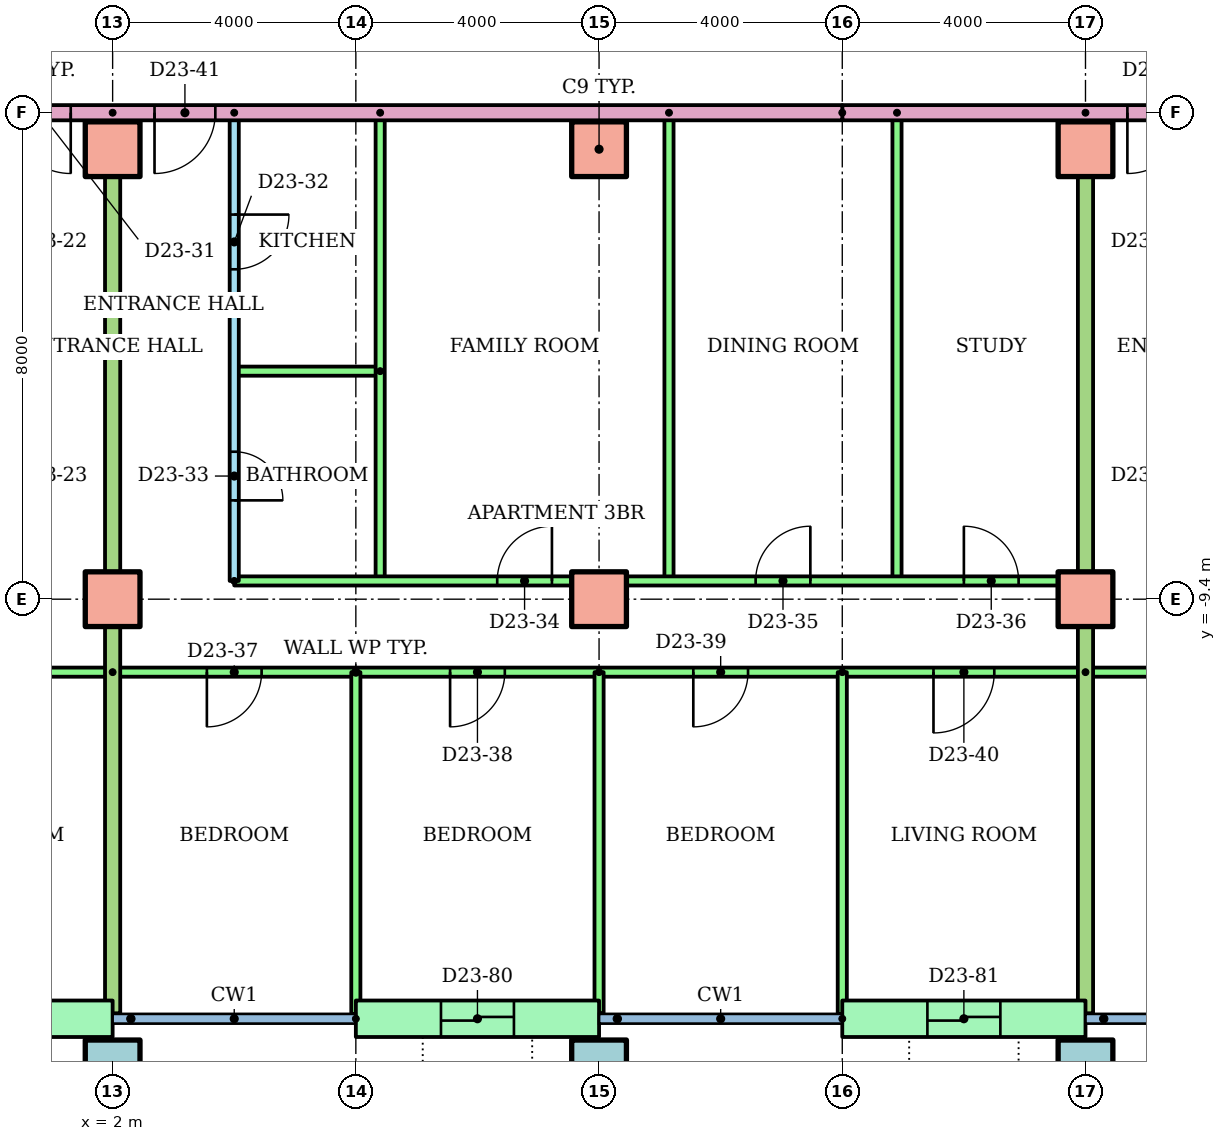
"""IFC4 building model, lengths in metres.
Left out: names, types, materials, properties, quantities, classifications, styles, units other than length and angle.
Written with IfcOpenShell. Run it as: python <this file> out.ifc"""

import sys

from ifc_helpers import new_model, si_unit, direction, frame, frame_2d, origin, origin_2d, place, context, subcontext, project, spatial, rectangle, hollow_rectangle, extrude, element, fill, save


model = new_model("IFC4")
c1 = context("Model", 3, precision=1e-05, world=origin(), true_north=direction((0.0, 1.0)))
c2 = subcontext(c1, "Body", "Model", "MODEL_VIEW")
j1 = project(units=[si_unit("LENGTHUNIT", "METRE"), si_unit("PLANEANGLEUNIT", "RADIAN")], contexts=[c1])
p1 = place(None, origin())
s1 = spatial("IfcSite", under=j1, at=p1, CompositionType="ELEMENT")
p2 = place(p1, origin())
s2 = spatial("IfcBuilding", under=s1, at=p2, CompositionType="ELEMENT")
p3 = place(p2, frame((0.0, 0.0, 90.3)))
s3 = spatial("IfcBuildingStorey", under=s2, at=p3, CompositionType="ELEMENT", Elevation=90.3)
for number, where in (
    (1, (2.0, -17.1, 0.0)),
    (2, (10.0, -17.1, 0.0)),
    (3, (18.0, -17.1, 0.0)),
):
    element("IfcColumn", number, at=place(p3, frame(where)), inside=s3, PredefinedType="COLUMN", context=c2, shape_type="SweptSolid", body=[
        extrude(hollow_rectangle(XDim=0.9, YDim=0.9, WallThickness=0.045, at=origin_2d()), origin(), (0.0, 0.0, 1.0), 3.2),
    ])
for number, where in (
    (4, (2.0, -9.4, 0.0)),
    (5, (10.0, -9.4, 0.0)),
    (6, (18.0, -9.4, 0.0)),
    (7, (2.0, -2.0, 0.0)),
    (8, (10.0, -2.0, 0.0)),
    (9, (18.0, -2.0, 0.0)),
):
    element("IfcColumn", number, at=place(p3, frame(where)), inside=s3, PredefinedType="COLUMN", context=c2, shape_type="SweptSolid", body=[
        extrude(rectangle(XDim=0.9, YDim=0.9, at=origin_2d()), origin(), (0.0, 0.0, 1.0), 3.2),
    ])
p4 = place(p3, frame((-2.0, -16.3, 0.0)))
e10 = element("IfcWall", 10, at=p4, inside=s3, PredefinedType="STANDARD", context=c2, shape_type="SweptSolid", body=[
    extrude(rectangle(XDim=4.0, YDim=0.6, at=frame_2d((2.0, 0.0))), origin(), (0.0, 0.0, 1.0), 2.92),
])
p5 = place(p4, frame((1.4, 0.0, 0.0)))
e11 = element("IfcOpeningElement", 11, at=p5, cuts=e10, PredefinedType="OPENING", context=c2, shape_type="SweptSolid", body=[
    extrude(rectangle(XDim=1.2, YDim=2.1, at=frame_2d((0.6, 1.05))), frame((0.0, 0.31, 0.0), z_axis=(0.0, -1.0, 0.0), x_axis=(1.0, 0.0, 0.0)), (0.0, 0.0, 1.0), 0.62),
])
p6 = place(p3, frame((6.0, -16.3, 0.0)))
e12 = element("IfcWall", 12, at=p6, inside=s3, PredefinedType="STANDARD", context=c2, shape_type="SweptSolid", body=[
    extrude(rectangle(XDim=4.0, YDim=0.6, at=frame_2d((2.0, 0.0))), origin(), (0.0, 0.0, 1.0), 2.92),
])
p7 = place(p6, frame((1.4, 0.0, 0.0)))
e13 = element("IfcOpeningElement", 13, at=p7, cuts=e12, PredefinedType="OPENING", context=c2, shape_type="SweptSolid", body=[
    extrude(rectangle(XDim=1.2, YDim=2.1, at=frame_2d((0.6, 1.05))), frame((0.0, 0.31, 0.0), z_axis=(0.0, -1.0, 0.0), x_axis=(1.0, 0.0, 0.0)), (0.0, 0.0, 1.0), 0.62),
])
p8 = place(p3, frame((14.0, -16.3, 0.0)))
e14 = element("IfcWall", 14, at=p8, inside=s3, PredefinedType="STANDARD", context=c2, shape_type="SweptSolid", body=[
    extrude(rectangle(XDim=4.0, YDim=0.6, at=frame_2d((2.0, 0.0))), origin(), (0.0, 0.0, 1.0), 2.92),
])
p9 = place(p8, frame((1.4, 0.0, 0.0)))
e15 = element("IfcOpeningElement", 15, at=p9, cuts=e14, PredefinedType="OPENING", context=c2, shape_type="SweptSolid", body=[
    extrude(rectangle(XDim=1.2, YDim=2.1, at=frame_2d((0.6, 1.05))), frame((0.0, 0.31, 0.0), z_axis=(0.0, -1.0, 0.0), x_axis=(1.0, 0.0, 0.0)), (0.0, 0.0, 1.0), 0.62),
])
p10 = place(p3, frame((2.0, -10.6, 0.0), z_axis=(0.0, 0.0, 1.0), x_axis=(-1.0, 0.0, 0.0)))
e16 = element("IfcWall", 16, at=p10, inside=s3, PredefinedType="PARTITIONING", context=c2, shape_type="SweptSolid", body=[
    extrude(rectangle(XDim=16.0, YDim=0.15, at=frame_2d((8.0, 0.0))), origin(), (0.0, 0.0, 1.0), 2.4),
])
p11 = place(p10, frame((13.55, 0.0, 0.0)))
e17 = element("IfcOpeningElement", 17, at=p11, cuts=e16, PredefinedType="OPENING", context=c2, shape_type="SweptSolid", body=[
    extrude(rectangle(XDim=0.9, YDim=2.1, at=frame_2d((0.45, 1.05))), frame((0.0, 0.085, 0.0), z_axis=(0.0, -1.0, 0.0), x_axis=(1.0, 0.0, 0.0)), (0.0, 0.0, 1.0), 0.17),
])
p12 = place(p10, frame((9.55, 0.0, 0.0)))
e18 = element("IfcOpeningElement", 18, at=p12, cuts=e16, PredefinedType="OPENING", context=c2, shape_type="SweptSolid", body=[
    extrude(rectangle(XDim=0.9, YDim=2.1, at=frame_2d((0.45, 1.05))), frame((0.0, 0.085, 0.0), z_axis=(0.0, -1.0, 0.0), x_axis=(1.0, 0.0, 0.0)), (0.0, 0.0, 1.0), 0.17),
])
p13 = place(p10, frame((5.55, 0.0, 0.0)))
e19 = element("IfcOpeningElement", 19, at=p13, cuts=e16, PredefinedType="OPENING", context=c2, shape_type="SweptSolid", body=[
    extrude(rectangle(XDim=0.9, YDim=2.1, at=frame_2d((0.45, 1.05))), frame((0.0, 0.085, 0.0), z_axis=(0.0, -1.0, 0.0), x_axis=(1.0, 0.0, 0.0)), (0.0, 0.0, 1.0), 0.17),
])
p14 = place(p10, frame((1.5, 0.0, 0.0)))
e20 = element("IfcOpeningElement", 20, at=p14, cuts=e16, PredefinedType="OPENING", context=c2, shape_type="SweptSolid", body=[
    extrude(rectangle(XDim=1.0, YDim=2.1, at=frame_2d((0.5, 1.05))), frame((0.0, 0.085, 0.0), z_axis=(0.0, -1.0, 0.0), x_axis=(1.0, 0.0, 0.0)), (0.0, 0.0, 1.0), 0.17),
])
p15 = place(p3, frame((4.0, -1.4, 0.0), z_axis=(0.0, 0.0, 1.0), x_axis=(0.0, -1.0, 0.0)))
e21 = element("IfcWall", 21, at=p15, inside=s3, PredefinedType="PARTITIONING", context=c2, shape_type="SweptSolid", body=[
    extrude(rectangle(XDim=7.7, YDim=0.15, at=frame_2d((3.85, 0.0))), origin(), (0.0, 0.0, 1.0), 2.4),
])
p16 = place(p15, frame((1.675, 0.0, 0.0)))
e22 = element("IfcOpeningElement", 22, at=p16, cuts=e21, PredefinedType="OPENING", context=c2, shape_type="SweptSolid", body=[
    extrude(rectangle(XDim=0.9, YDim=2.1, at=frame_2d((0.45, 1.05))), frame((0.0, 0.085, 0.0), z_axis=(0.0, -1.0, 0.0), x_axis=(1.0, 0.0, 0.0)), (0.0, 0.0, 1.0), 0.17),
])
p17 = place(p15, frame((5.575, 0.0, 0.0)))
e23 = element("IfcOpeningElement", 23, at=p17, cuts=e21, PredefinedType="OPENING", context=c2, shape_type="SweptSolid", body=[
    extrude(rectangle(XDim=0.8, YDim=2.1, at=frame_2d((0.4, 1.05))), frame((0.0, 0.085, 0.0), z_axis=(0.0, -1.0, 0.0), x_axis=(1.0, 0.0, 0.0)), (0.0, 0.0, 1.0), 0.17),
])
p18 = place(p3, frame((6.4, -5.65, 0.0), z_axis=(0.0, 0.0, 1.0), x_axis=(-1.0, 0.0, 0.0)))
e24 = element("IfcWall", 24, at=p18, inside=s3, PredefinedType="PARTITIONING", context=c2, shape_type="SweptSolid", body=[
    extrude(rectangle(XDim=2.4, YDim=0.15, at=frame_2d((1.2, 0.0))), origin(), (0.0, 0.0, 1.0), 2.4),
])
for number, where, z_axis, x_axis in (
    (25, (6.4, -1.4, 0.0), (0.0, 0.0, 1.0), (0.0, -1.0, 0.0)),
    (26, (11.15, -1.4, 0.0), (0.0, 0.0, 1.0), (0.0, -1.0, 0.0)),
    (27, (14.9, -1.4, 0.0), (0.0, 0.0, 1.0), (0.0, -1.0, 0.0)),
):
    element("IfcWall", number, at=place(p3, frame(where, z_axis=z_axis, x_axis=x_axis)), inside=s3, PredefinedType="PARTITIONING", context=c2, shape_type="SweptSolid", body=[
        extrude(rectangle(XDim=7.7, YDim=0.15, at=frame_2d((3.85, 0.0))), origin(), (0.0, 0.0, 1.0), 2.4),
    ])
p19 = place(p3, frame((4.0, -9.1, 0.0)))
e28 = element("IfcWall", 28, at=p19, inside=s3, PredefinedType="PARTITIONING", context=c2, shape_type="SweptSolid", body=[
    extrude(rectangle(XDim=14.0, YDim=0.15, at=frame_2d((7.0, 0.0))), origin(), (0.0, 0.0, 1.0), 2.4),
])
p20 = place(p19, frame((4.325, 0.0, 0.0)))
e29 = element("IfcOpeningElement", 29, at=p20, cuts=e28, PredefinedType="OPENING", context=c2, shape_type="SweptSolid", body=[
    extrude(rectangle(XDim=0.9, YDim=2.1, at=frame_2d((0.45, 1.05))), frame((0.0, 0.085, 0.0), z_axis=(0.0, -1.0, 0.0), x_axis=(1.0, 0.0, 0.0)), (0.0, 0.0, 1.0), 0.17),
])
p21 = place(p19, frame((8.575, 0.0, 0.0)))
e30 = element("IfcOpeningElement", 30, at=p21, cuts=e28, PredefinedType="OPENING", context=c2, shape_type="SweptSolid", body=[
    extrude(rectangle(XDim=0.9, YDim=2.1, at=frame_2d((0.45, 1.05))), frame((0.0, 0.085, 0.0), z_axis=(0.0, -1.0, 0.0), x_axis=(1.0, 0.0, 0.0)), (0.0, 0.0, 1.0), 0.17),
])
p22 = place(p19, frame((12.0, 0.0, 0.0)))
e31 = element("IfcOpeningElement", 31, at=p22, cuts=e28, PredefinedType="OPENING", context=c2, shape_type="SweptSolid", body=[
    extrude(rectangle(XDim=0.9, YDim=2.1, at=frame_2d((0.45, 1.05))), frame((0.0, 0.085, 0.0), z_axis=(0.0, -1.0, 0.0), x_axis=(1.0, 0.0, 0.0)), (0.0, 0.0, 1.0), 0.17),
])
p23 = place(p3, frame((18.0, -10.6, 0.0), z_axis=(0.0, 0.0, 1.0), x_axis=(-1.0, 0.0, 0.0)))
e32 = element("IfcWall", 32, at=p23, inside=s3, PredefinedType="PARTITIONING", context=c2, shape_type="SweptSolid", body=[
    extrude(rectangle(XDim=16.0, YDim=0.15, at=frame_2d((8.0, 0.0))), origin(), (0.0, 0.0, 1.0), 2.4),
])
p24 = place(p23, frame((13.55, 0.0, 0.0)))
e33 = element("IfcOpeningElement", 33, at=p24, cuts=e32, PredefinedType="OPENING", context=c2, shape_type="SweptSolid", body=[
    extrude(rectangle(XDim=0.9, YDim=2.1, at=frame_2d((0.45, 1.05))), frame((0.0, 0.085, 0.0), z_axis=(0.0, -1.0, 0.0), x_axis=(1.0, 0.0, 0.0)), (0.0, 0.0, 1.0), 0.17),
])
p25 = place(p23, frame((9.55, 0.0, 0.0)))
e34 = element("IfcOpeningElement", 34, at=p25, cuts=e32, PredefinedType="OPENING", context=c2, shape_type="SweptSolid", body=[
    extrude(rectangle(XDim=0.9, YDim=2.1, at=frame_2d((0.45, 1.05))), frame((0.0, 0.085, 0.0), z_axis=(0.0, -1.0, 0.0), x_axis=(1.0, 0.0, 0.0)), (0.0, 0.0, 1.0), 0.17),
])
p26 = place(p23, frame((5.55, 0.0, 0.0)))
e35 = element("IfcOpeningElement", 35, at=p26, cuts=e32, PredefinedType="OPENING", context=c2, shape_type="SweptSolid", body=[
    extrude(rectangle(XDim=0.9, YDim=2.1, at=frame_2d((0.45, 1.05))), frame((0.0, 0.085, 0.0), z_axis=(0.0, -1.0, 0.0), x_axis=(1.0, 0.0, 0.0)), (0.0, 0.0, 1.0), 0.17),
])
p27 = place(p23, frame((1.5, 0.0, 0.0)))
e36 = element("IfcOpeningElement", 36, at=p27, cuts=e32, PredefinedType="OPENING", context=c2, shape_type="SweptSolid", body=[
    extrude(rectangle(XDim=1.0, YDim=2.1, at=frame_2d((0.5, 1.05))), frame((0.0, 0.085, 0.0), z_axis=(0.0, -1.0, 0.0), x_axis=(1.0, 0.0, 0.0)), (0.0, 0.0, 1.0), 0.17),
])
p28 = place(p3, frame((6.0, -10.6, 0.0), z_axis=(0.0, 0.0, 1.0), x_axis=(0.0, -1.0, 0.0)))
e37 = element("IfcWall", 37, at=p28, inside=s3, PredefinedType="PARTITIONING", context=c2, shape_type="SweptSolid", body=[
    extrude(rectangle(XDim=5.621, YDim=0.15, at=frame_2d((2.811, 0.0))), origin(), (0.0, 0.0, 1.0), 2.4),
])
p29 = place(p3, frame((10.0, -10.6, 0.0), z_axis=(0.0, 0.0, 1.0), x_axis=(0.0, -1.0, 0.0)))
e38 = element("IfcWall", 38, at=p29, inside=s3, PredefinedType="PARTITIONING", context=c2, shape_type="SweptSolid", body=[
    extrude(rectangle(XDim=5.61, YDim=0.15, at=frame_2d((2.805, 0.0))), origin(), (0.0, 0.0, 1.0), 2.4),
])
p30 = place(p3, frame((14.0, -10.6, 0.0), z_axis=(0.0, 0.0, 1.0), x_axis=(0.0, -1.0, 0.0)))
e39 = element("IfcWall", 39, at=p30, inside=s3, PredefinedType="PARTITIONING", context=c2, shape_type="SweptSolid", body=[
    extrude(rectangle(XDim=5.621, YDim=0.15, at=frame_2d((2.811, 0.0))), origin(), (0.0, 0.0, 1.0), 2.4),
])
p31 = place(p3, frame((2.0, -1.4, 0.0), z_axis=(0.0, 0.0, 1.0), x_axis=(0.0, -1.0, 0.0)))
e40 = element("IfcWall", 40, at=p31, inside=s3, PredefinedType="PARTITIONING", context=c2, shape_type="SweptSolid", body=[
    extrude(rectangle(XDim=14.81, YDim=0.25, at=frame_2d((7.405, 0.0))), origin(), (0.0, 0.0, 1.0), 2.4),
])
p32 = place(p3, frame((40.62, -10.6, 0.0), z_axis=(0.0, 0.0, 1.0), x_axis=(-1.0, 0.0, 0.0)))
e41 = element("IfcWall", 41, at=p32, inside=s3, PredefinedType="PARTITIONING", context=c2, shape_type="SweptSolid", body=[
    extrude(rectangle(XDim=22.62, YDim=0.15, at=frame_2d((11.31, 0.0))), origin(), (0.0, 0.0, 1.0), 2.4),
])
p33 = place(p32, frame((20.17, 0.0, 0.0)))
e42 = element("IfcOpeningElement", 42, at=p33, cuts=e41, PredefinedType="OPENING", context=c2, shape_type="SweptSolid", body=[
    extrude(rectangle(XDim=0.9, YDim=2.1, at=frame_2d((0.45, 1.05))), frame((0.0, 0.085, 0.0), z_axis=(0.0, -1.0, 0.0), x_axis=(1.0, 0.0, 0.0)), (0.0, 0.0, 1.0), 0.17),
])
p34 = place(p32, frame((16.12, 0.0, 0.0)))
e43 = element("IfcOpeningElement", 43, at=p34, cuts=e41, PredefinedType="OPENING", context=c2, shape_type="SweptSolid", body=[
    extrude(rectangle(XDim=1.0, YDim=2.1, at=frame_2d((0.5, 1.05))), frame((0.0, 0.085, 0.0), z_axis=(0.0, -1.0, 0.0), x_axis=(1.0, 0.0, 0.0)), (0.0, 0.0, 1.0), 0.17),
])
p35 = place(p32, frame((12.17, 0.0, 0.0)))
e44 = element("IfcOpeningElement", 44, at=p35, cuts=e41, PredefinedType="OPENING", context=c2, shape_type="SweptSolid", body=[
    extrude(rectangle(XDim=0.9, YDim=2.1, at=frame_2d((0.45, 1.05))), frame((0.0, 0.085, 0.0), z_axis=(0.0, -1.0, 0.0), x_axis=(1.0, 0.0, 0.0)), (0.0, 0.0, 1.0), 0.17),
])
p36 = place(p32, frame((8.17, 0.0, 0.0)))
e45 = element("IfcOpeningElement", 45, at=p36, cuts=e41, PredefinedType="OPENING", context=c2, shape_type="SweptSolid", body=[
    extrude(rectangle(XDim=0.9, YDim=2.1, at=frame_2d((0.45, 1.05))), frame((0.0, 0.085, 0.0), z_axis=(0.0, -1.0, 0.0), x_axis=(1.0, 0.0, 0.0)), (0.0, 0.0, 1.0), 0.17),
])
p37 = place(p32, frame((2.97, 0.0, 0.0)))
e46 = element("IfcOpeningElement", 46, at=p37, cuts=e41, PredefinedType="OPENING", context=c2, shape_type="SweptSolid", body=[
    extrude(rectangle(XDim=0.9, YDim=2.1, at=frame_2d((0.45, 1.05))), frame((0.0, 0.085, 0.0), z_axis=(0.0, -1.0, 0.0), x_axis=(1.0, 0.0, 0.0)), (0.0, 0.0, 1.0), 0.17),
])
p38 = place(p3, frame((18.0, -1.4, 0.0), z_axis=(0.0, 0.0, 1.0), x_axis=(0.0, -1.0, 0.0)))
e47 = element("IfcWall", 47, at=p38, inside=s3, PredefinedType="PARTITIONING", context=c2, shape_type="SweptSolid", body=[
    extrude(rectangle(XDim=14.81, YDim=0.25, at=frame_2d((7.405, 0.0))), origin(), (0.0, 0.0, 1.0), 2.4),
])
p39 = place(p3, frame((29.0, -1.4, 0.0), z_axis=(0.0, 0.0, 1.0), x_axis=(-1.0, 0.0, 0.0)))
e48 = element("IfcWall", 48, at=p39, inside=s3, PredefinedType="PARTITIONING", context=c2, shape_type="SweptSolid", body=[
    extrude(rectangle(XDim=15.0, YDim=0.25, at=frame_2d((7.5, 0.0))), origin(), (0.0, 0.0, 1.0), 2.4),
])
p40 = place(p39, frame((9.311, 0.0, 0.0)))
e49 = element("IfcOpeningElement", 49, at=p40, cuts=e48, PredefinedType="OPENING", context=c2, shape_type="SweptSolid", body=[
    extrude(rectangle(XDim=1.0, YDim=2.1, at=frame_2d((0.5, 1.05))), frame((0.0, 0.135, 0.0), z_axis=(0.0, -1.0, 0.0), x_axis=(1.0, 0.0, 0.0)), (0.0, 0.0, 1.0), 0.27),
])
p41 = place(p3, frame((14.0, -1.4, 0.0), z_axis=(0.0, 0.0, 1.0), x_axis=(-1.0, 0.0, 0.0)))
e50 = element("IfcWall", 50, at=p41, inside=s3, PredefinedType="PARTITIONING", context=c2, shape_type="SweptSolid", body=[
    extrude(rectangle(XDim=28.0, YDim=0.25, at=frame_2d((14.0, 0.0))), origin(), (0.0, 0.0, 1.0), 2.4),
])
p42 = place(p41, frame((12.689, 0.0, 0.0)))
e51 = element("IfcOpeningElement", 51, at=p42, cuts=e50, PredefinedType="OPENING", context=c2, shape_type="SweptSolid", body=[
    extrude(rectangle(XDim=1.0, YDim=2.1, at=frame_2d((0.5, 1.05))), frame((0.0, 0.135, 0.0), z_axis=(0.0, -1.0, 0.0), x_axis=(1.0, 0.0, 0.0)), (0.0, 0.0, 1.0), 0.27),
])
p43 = place(p41, frame((10.311, 0.0, 0.0)))
e52 = element("IfcOpeningElement", 52, at=p43, cuts=e50, PredefinedType="OPENING", context=c2, shape_type="SweptSolid", body=[
    extrude(rectangle(XDim=1.0, YDim=2.1, at=frame_2d((0.5, 1.05))), frame((0.0, 0.135, 0.0), z_axis=(0.0, -1.0, 0.0), x_axis=(1.0, 0.0, 0.0)), (0.0, 0.0, 1.0), 0.27),
])
p44 = place(p42, origin())
e53 = element("IfcDoor", 53, at=p44, inside=s3, OperationType="SINGLE_SWING_LEFT", PredefinedType="DOOR", context=c2, shape_type="SweptSolid", body=[
    extrude(rectangle(XDim=1.0, YDim=2.1, at=frame_2d((0.5, 1.05))), frame((0.0, 0.025, 0.0), z_axis=(0.0, -1.0, 0.0), x_axis=(1.0, 0.0, 0.0)), (0.0, 0.0, 1.0), 0.05),
])
fill(e51, e53)
p45 = place(p16, origin())
e54 = element("IfcDoor", 54, at=p45, inside=s3, OperationType="SINGLE_SWING_LEFT", PredefinedType="DOOR", context=c2, shape_type="SweptSolid", body=[
    extrude(rectangle(XDim=0.9, YDim=2.1, at=frame_2d((0.45, 1.05))), frame((0.0, 0.025, 0.0), z_axis=(0.0, -1.0, 0.0), x_axis=(1.0, 0.0, 0.0)), (0.0, 0.0, 1.0), 0.05),
])
fill(e22, e54)
p46 = place(p17, origin())
e55 = element("IfcDoor", 55, at=p46, inside=s3, OperationType="SINGLE_SWING_RIGHT", PredefinedType="DOOR", context=c2, shape_type="SweptSolid", body=[
    extrude(rectangle(XDim=0.8, YDim=2.1, at=frame_2d((0.4, 1.05))), frame((0.0, 0.025, 0.0), z_axis=(0.0, -1.0, 0.0), x_axis=(1.0, 0.0, 0.0)), (0.0, 0.0, 1.0), 0.05),
])
fill(e23, e55)
p47 = place(p20, origin())
e56 = element("IfcDoor", 56, at=p47, inside=s3, OperationType="SINGLE_SWING_RIGHT", PredefinedType="DOOR", context=c2, shape_type="SweptSolid", body=[
    extrude(rectangle(XDim=0.9, YDim=2.1, at=frame_2d((0.45, 1.05))), frame((0.0, 0.025, 0.0), z_axis=(0.0, -1.0, 0.0), x_axis=(1.0, 0.0, 0.0)), (0.0, 0.0, 1.0), 0.05),
])
fill(e29, e56)
p48 = place(p21, origin())
e57 = element("IfcDoor", 57, at=p48, inside=s3, OperationType="SINGLE_SWING_RIGHT", PredefinedType="DOOR", context=c2, shape_type="SweptSolid", body=[
    extrude(rectangle(XDim=0.9, YDim=2.1, at=frame_2d((0.45, 1.05))), frame((0.0, 0.025, 0.0), z_axis=(0.0, -1.0, 0.0), x_axis=(1.0, 0.0, 0.0)), (0.0, 0.0, 1.0), 0.05),
])
fill(e30, e57)
p49 = place(p22, origin())
e58 = element("IfcDoor", 58, at=p49, inside=s3, OperationType="SINGLE_SWING_LEFT", PredefinedType="DOOR", context=c2, shape_type="SweptSolid", body=[
    extrude(rectangle(XDim=0.9, YDim=2.1, at=frame_2d((0.45, 1.05))), frame((0.0, 0.025, 0.0), z_axis=(0.0, -1.0, 0.0), x_axis=(1.0, 0.0, 0.0)), (0.0, 0.0, 1.0), 0.05),
])
fill(e31, e58)
p50 = place(p24, origin())
e59 = element("IfcDoor", 59, at=p50, inside=s3, OperationType="SINGLE_SWING_RIGHT", PredefinedType="DOOR", context=c2, shape_type="SweptSolid", body=[
    extrude(rectangle(XDim=0.9, YDim=2.1, at=frame_2d((0.45, 1.05))), frame((0.0, 0.025, 0.0), z_axis=(0.0, -1.0, 0.0), x_axis=(1.0, 0.0, 0.0)), (0.0, 0.0, 1.0), 0.05),
])
fill(e33, e59)
p51 = place(p25, origin())
e60 = element("IfcDoor", 60, at=p51, inside=s3, OperationType="SINGLE_SWING_RIGHT", PredefinedType="DOOR", context=c2, shape_type="SweptSolid", body=[
    extrude(rectangle(XDim=0.9, YDim=2.1, at=frame_2d((0.45, 1.05))), frame((0.0, 0.025, 0.0), z_axis=(0.0, -1.0, 0.0), x_axis=(1.0, 0.0, 0.0)), (0.0, 0.0, 1.0), 0.05),
])
fill(e34, e60)
p52 = place(p26, origin())
e61 = element("IfcDoor", 61, at=p52, inside=s3, OperationType="SINGLE_SWING_RIGHT", PredefinedType="DOOR", context=c2, shape_type="SweptSolid", body=[
    extrude(rectangle(XDim=0.9, YDim=2.1, at=frame_2d((0.45, 1.05))), frame((0.0, 0.025, 0.0), z_axis=(0.0, -1.0, 0.0), x_axis=(1.0, 0.0, 0.0)), (0.0, 0.0, 1.0), 0.05),
])
fill(e35, e61)
p53 = place(p27, origin())
e62 = element("IfcDoor", 62, at=p53, inside=s3, OperationType="SINGLE_SWING_RIGHT", PredefinedType="DOOR", context=c2, shape_type="SweptSolid", body=[
    extrude(rectangle(XDim=1.0, YDim=2.1, at=frame_2d((0.5, 1.05))), frame((0.0, 0.025, 0.0), z_axis=(0.0, -1.0, 0.0), x_axis=(1.0, 0.0, 0.0)), (0.0, 0.0, 1.0), 0.05),
])
fill(e36, e62)
p54 = place(p43, origin())
e63 = element("IfcDoor", 63, at=p54, inside=s3, OperationType="SINGLE_SWING_RIGHT", PredefinedType="DOOR", context=c2, shape_type="SweptSolid", body=[
    extrude(rectangle(XDim=1.0, YDim=2.1, at=frame_2d((0.5, 1.05))), frame((0.0, 0.025, 0.0), z_axis=(0.0, -1.0, 0.0), x_axis=(1.0, 0.0, 0.0)), (0.0, 0.0, 1.0), 0.05),
])
fill(e52, e63)
p55 = place(p40, origin())
e64 = element("IfcDoor", 64, at=p55, inside=s3, OperationType="SINGLE_SWING_RIGHT", PredefinedType="DOOR", context=c2, shape_type="SweptSolid", body=[
    extrude(rectangle(XDim=1.0, YDim=2.1, at=frame_2d((0.5, 1.05))), frame((0.0, 0.025, 0.0), z_axis=(0.0, -1.0, 0.0), x_axis=(1.0, 0.0, 0.0)), (0.0, 0.0, 1.0), 0.05),
])
fill(e49, e64)
p56 = place(p7, origin())
e65 = element("IfcDoor", 65, at=p56, inside=s3, OperationType="SLIDING_TO_LEFT", PredefinedType="DOOR", context=c2, shape_type="SweptSolid", body=[
    extrude(rectangle(XDim=1.2, YDim=2.1, at=frame_2d((0.6, 1.05))), frame((0.0, 0.025, 0.0), z_axis=(0.0, -1.0, 0.0), x_axis=(1.0, 0.0, 0.0)), (0.0, 0.0, 1.0), 0.05),
])
fill(e13, e65)
p57 = place(p9, origin())
e66 = element("IfcDoor", 66, at=p57, inside=s3, OperationType="SLIDING_TO_LEFT", PredefinedType="DOOR", context=c2, shape_type="SweptSolid", body=[
    extrude(rectangle(XDim=1.2, YDim=2.1, at=frame_2d((0.6, 1.05))), frame((0.0, 0.025, 0.0), z_axis=(0.0, -1.0, 0.0), x_axis=(1.0, 0.0, 0.0)), (0.0, 0.0, 1.0), 0.05),
])
fill(e15, e66)
save(model, sys.argv[1])
